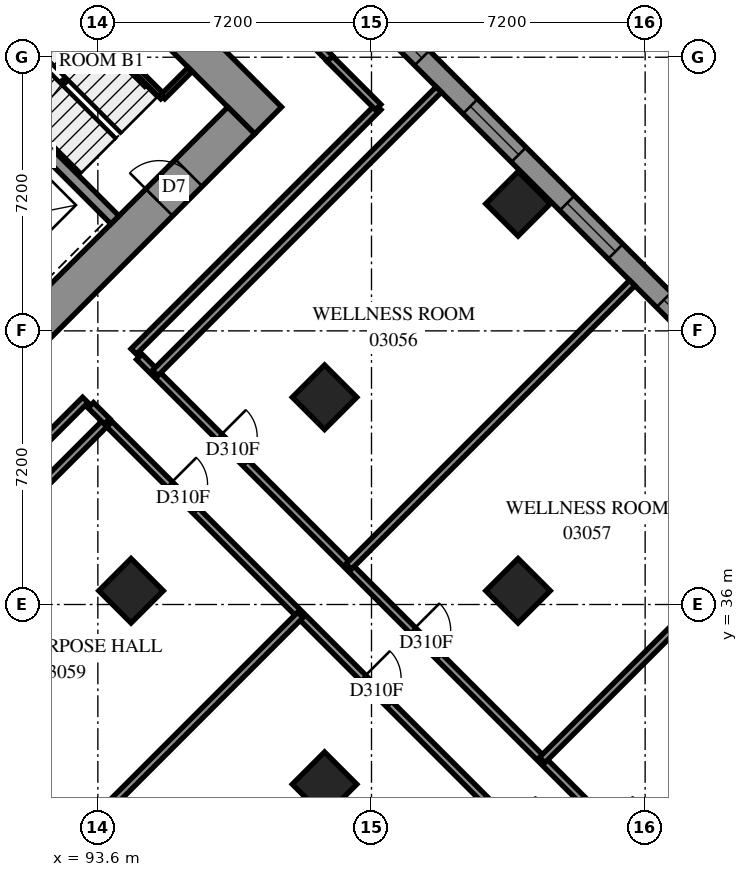
"""IFC4 building model, lengths in metres.
Left out: names, types, materials, properties, quantities, classifications, styles, units other than length and angle.
Written with IfcOpenShell. Run it as: python <this file> out.ifc"""

import sys

from ifc_helpers import new_model, si_unit, direction, frame, frame_2d, origin, origin_2d, place, context, subcontext, project, spatial, polyline, rectangle, outline, extrude, element, fill, save


model = new_model("IFC4")
c1 = context("Model", 3, precision=1e-05, world=origin(), true_north=direction((0.0, 1.0)))
c2 = subcontext(c1, "Body", "Model", "MODEL_VIEW")
j1 = project(units=[si_unit("LENGTHUNIT", "METRE"), si_unit("PLANEANGLEUNIT", "RADIAN")], contexts=[c1])
p1 = place(None, origin())
s1 = spatial("IfcSite", under=j1, at=p1, CompositionType="ELEMENT")
p2 = place(p1, origin())
s2 = spatial("IfcBuilding", under=s1, at=p2, CompositionType="ELEMENT")
p3 = place(p2, frame((0.0, 0.0, 14.4)))
s3 = spatial("IfcBuildingStorey", under=s2, at=p3, CompositionType="ELEMENT", Elevation=14.4)
for number, where, z_axis, x_axis in (
    (1, (104.656, 46.544, 0.0), (0.0, 0.0, 1.0), (0.707, -0.707, 0.0)),
    (2, (99.565, 41.453, 0.0), (0.0, 0.0, 1.0), (0.707, -0.707, 0.0)),
    (3, (94.474, 36.362, 0.0), (0.0, 0.0, 1.0), (0.707, -0.707, 0.0)),
    (4, (104.656, 36.362, 0.0), (0.0, 0.0, 1.0), (0.707, -0.707, 0.0)),
    (5, (99.565, 31.271, 0.0), (0.0, 0.0, 1.0), (0.707, -0.707, 0.0)),
):
    element("IfcColumn", number, at=place(p3, frame(where, z_axis=z_axis, x_axis=x_axis)), inside=s3, PredefinedType="COLUMN", context=c2, shape_type="SweptSolid", body=[
        extrude(rectangle(XDim=1.2, YDim=1.2, at=origin_2d()), origin(), (0.0, 0.0, 1.0), 3.8),
    ])
p4 = place(p3, frame((86.483, 60.333, -0.4), z_axis=(0.0, 0.0, 1.0), x_axis=(0.70710983, -0.7071037324, 0.0)))
e6 = element("IfcWall", 6, at=p4, inside=s3, PredefinedType="SHEAR", context=c2, shape_type="SweptSolid", body=[
    extrude(rectangle(XDim=16.4, YDim=1.0, at=frame_2d((8.2, 0.0))), origin(), (0.0, 0.0, 1.0), 3.5),
])
p5 = place(p4, frame((11.0, 0.0, 0.4)))
e7 = element("IfcOpeningElement", 7, at=p5, cuts=e6, PredefinedType="OPENING", context=c2, shape_type="SweptSolid", body=[
    extrude(rectangle(XDim=0.8, YDim=2.1, at=frame_2d((0.4, 1.05))), frame((0.0, 0.51, 0.0), z_axis=(0.0, -1.0, 0.0), x_axis=(1.0, 0.0, 0.0)), (0.0, 0.0, 1.0), 1.02),
])
p6 = place(p3, frame((87.19, 38.554, -0.4), z_axis=(0.0, 0.0, 1.0), x_axis=(0.707103309, 0.7071102534, 0.0)))
e8 = element("IfcWall", 8, at=p6, inside=s3, PredefinedType="SHEAR", context=c2, shape_type="SweptSolid", body=[
    extrude(rectangle(XDim=14.4, YDim=1.0, at=frame_2d((7.2, 0.0))), origin(), (0.0, 0.0, 1.0), 3.5),
])
p7 = place(p6, frame((4.55, 0.0, 0.4)))
e9 = element("IfcOpeningElement", 9, at=p7, cuts=e8, PredefinedType="OPENING", context=c2, shape_type="SweptSolid", body=[
    extrude(rectangle(XDim=1.1, YDim=2.1, at=frame_2d((0.55, 1.05))), frame((0.0, 0.51, 0.0), z_axis=(0.0, -1.0, 0.0), x_axis=(1.0, 0.0, 0.0)), (0.0, 0.0, 1.0), 1.02),
])
p8 = place(p6, frame((11.35, 0.0, 0.4)))
e10 = element("IfcOpeningElement", 10, at=p8, cuts=e8, PredefinedType="OPENING", context=c2, shape_type="SweptSolid", body=[
    extrude(rectangle(XDim=1.1, YDim=2.1, at=frame_2d((0.55, 1.05))), frame((0.0, 0.51, 0.0), z_axis=(0.0, -1.0, 0.0), x_axis=(1.0, 0.0, 0.0)), (0.0, 0.0, 1.0), 1.02),
])
p9 = place(p3, frame((88.958, 51.211, 0.0), z_axis=(0.0, 0.0, 1.0), x_axis=(0.7070998367, -0.7071137256, 0.0)))
e11 = element("IfcWall", 11, at=p9, inside=s3, PredefinedType="SOLIDWALL", context=c2, shape_type="SweptSolid", body=[
    extrude(rectangle(XDim=7.2, YDim=0.3, at=frame_2d((3.6, 0.0))), origin(), (0.0, 0.0, 1.0), 3.8),
])
p10 = place(p3, frame((117.843, 34.665, 0.0), z_axis=(0.0, 0.0, 1.0), x_axis=(-0.7071067812, 0.7071067812, 0.0)))
e12 = element("IfcWall", 12, at=p10, inside=s3, PredefinedType="SOLIDWALL", context=c2, shape_type="SweptSolid", body=[
    extrude(outline(polyline([(-0.275, -0.275), (54.222, -0.275), (53.994, 0.275), (0.275, 0.275), (-0.275, -0.275)])), origin(), (0.0, 0.0, 1.0), 3.8),
])
p11 = place(p10, frame((0.8, 0.0, 0.7)))
e13 = element("IfcOpeningElement", 13, at=p11, cuts=e12, PredefinedType="OPENING", context=c2, shape_type="SweptSolid", body=[
    extrude(rectangle(XDim=1.8, YDim=2.6, at=frame_2d((0.9, 1.3))), frame((0.0, 0.285, 0.0), z_axis=(0.0, -1.0, 0.0), x_axis=(1.0, 0.0, 0.0)), (0.0, 0.0, 1.0), 0.57),
])
p12 = place(p10, frame((4.225, 0.0, 0.7)))
e14 = element("IfcOpeningElement", 14, at=p12, cuts=e12, PredefinedType="OPENING", context=c2, shape_type="SweptSolid", body=[
    extrude(rectangle(XDim=1.8, YDim=2.6, at=frame_2d((0.9, 1.3))), frame((0.0, 0.285, 0.0), z_axis=(0.0, -1.0, 0.0), x_axis=(1.0, 0.0, 0.0)), (0.0, 0.0, 1.0), 0.57),
])
p13 = place(p10, frame((7.825, 0.0, 0.7)))
e15 = element("IfcOpeningElement", 15, at=p13, cuts=e12, PredefinedType="OPENING", context=c2, shape_type="SweptSolid", body=[
    extrude(rectangle(XDim=1.8, YDim=2.6, at=frame_2d((0.9, 1.3))), frame((0.0, 0.285, 0.0), z_axis=(0.0, -1.0, 0.0), x_axis=(1.0, 0.0, 0.0)), (0.0, 0.0, 1.0), 0.57),
])
p14 = place(p10, frame((11.425, 0.0, 0.7)))
e16 = element("IfcOpeningElement", 16, at=p14, cuts=e12, PredefinedType="OPENING", context=c2, shape_type="SweptSolid", body=[
    extrude(rectangle(XDim=1.8, YDim=2.6, at=frame_2d((0.9, 1.3))), frame((0.0, 0.285, 0.0), z_axis=(0.0, -1.0, 0.0), x_axis=(1.0, 0.0, 0.0)), (0.0, 0.0, 1.0), 0.57),
])
p15 = place(p10, frame((15.025, 0.0, 0.7)))
e17 = element("IfcOpeningElement", 17, at=p15, cuts=e12, PredefinedType="OPENING", context=c2, shape_type="SweptSolid", body=[
    extrude(rectangle(XDim=1.8, YDim=2.6, at=frame_2d((0.9, 1.3))), frame((0.0, 0.285, 0.0), z_axis=(0.0, -1.0, 0.0), x_axis=(1.0, 0.0, 0.0)), (0.0, 0.0, 1.0), 0.57),
])
p16 = place(p10, frame((18.625, 0.0, 0.7)))
e18 = element("IfcOpeningElement", 18, at=p16, cuts=e12, PredefinedType="OPENING", context=c2, shape_type="SweptSolid", body=[
    extrude(rectangle(XDim=1.8, YDim=2.6, at=frame_2d((0.9, 1.3))), frame((0.0, 0.285, 0.0), z_axis=(0.0, -1.0, 0.0), x_axis=(1.0, 0.0, 0.0)), (0.0, 0.0, 1.0), 0.57),
])
p17 = place(p10, frame((22.225, 0.0, 0.7)))
e19 = element("IfcOpeningElement", 19, at=p17, cuts=e12, PredefinedType="OPENING", context=c2, shape_type="SweptSolid", body=[
    extrude(rectangle(XDim=1.8, YDim=2.6, at=frame_2d((0.9, 1.3))), frame((0.0, 0.285, 0.0), z_axis=(0.0, -1.0, 0.0), x_axis=(1.0, 0.0, 0.0)), (0.0, 0.0, 1.0), 0.57),
])
p18 = place(p10, frame((25.825, 0.0, 0.7)))
e20 = element("IfcOpeningElement", 20, at=p18, cuts=e12, PredefinedType="OPENING", context=c2, shape_type="SweptSolid", body=[
    extrude(rectangle(XDim=1.8, YDim=2.6, at=frame_2d((0.9, 1.3))), frame((0.0, 0.285, 0.0), z_axis=(0.0, -1.0, 0.0), x_axis=(1.0, 0.0, 0.0)), (0.0, 0.0, 1.0), 0.57),
])
p19 = place(p10, frame((29.425, 0.0, 0.7)))
e21 = element("IfcOpeningElement", 21, at=p19, cuts=e12, PredefinedType="OPENING", context=c2, shape_type="SweptSolid", body=[
    extrude(rectangle(XDim=1.8, YDim=2.6, at=frame_2d((0.9, 1.3))), frame((0.0, 0.285, 0.0), z_axis=(0.0, -1.0, 0.0), x_axis=(1.0, 0.0, 0.0)), (0.0, 0.0, 1.0), 0.57),
])
p20 = place(p10, frame((33.025, 0.0, 0.7)))
e22 = element("IfcOpeningElement", 22, at=p20, cuts=e12, PredefinedType="OPENING", context=c2, shape_type="SweptSolid", body=[
    extrude(rectangle(XDim=1.8, YDim=2.6, at=frame_2d((0.9, 1.3))), frame((0.0, 0.285, 0.0), z_axis=(0.0, -1.0, 0.0), x_axis=(1.0, 0.0, 0.0)), (0.0, 0.0, 1.0), 0.57),
])
p21 = place(p10, frame((36.625, 0.0, 0.7)))
e23 = element("IfcOpeningElement", 23, at=p21, cuts=e12, PredefinedType="OPENING", context=c2, shape_type="SweptSolid", body=[
    extrude(rectangle(XDim=1.8, YDim=2.6, at=frame_2d((0.9, 1.3))), frame((0.0, 0.285, 0.0), z_axis=(0.0, -1.0, 0.0), x_axis=(1.0, 0.0, 0.0)), (0.0, 0.0, 1.0), 0.57),
])
p22 = place(p10, frame((40.225, 0.0, 0.7)))
e24 = element("IfcOpeningElement", 24, at=p22, cuts=e12, PredefinedType="OPENING", context=c2, shape_type="SweptSolid", body=[
    extrude(rectangle(XDim=1.8, YDim=2.6, at=frame_2d((0.9, 1.3))), frame((0.0, 0.285, 0.0), z_axis=(0.0, -1.0, 0.0), x_axis=(1.0, 0.0, 0.0)), (0.0, 0.0, 1.0), 0.57),
])
p23 = place(p10, frame((43.825, 0.0, 0.7)))
e25 = element("IfcOpeningElement", 25, at=p23, cuts=e12, PredefinedType="OPENING", context=c2, shape_type="SweptSolid", body=[
    extrude(rectangle(XDim=1.8, YDim=2.6, at=frame_2d((0.9, 1.3))), frame((0.0, 0.285, 0.0), z_axis=(0.0, -1.0, 0.0), x_axis=(1.0, 0.0, 0.0)), (0.0, 0.0, 1.0), 0.57),
])
p24 = place(p10, frame((47.425, 0.0, 0.7)))
e26 = element("IfcOpeningElement", 26, at=p24, cuts=e12, PredefinedType="OPENING", context=c2, shape_type="SweptSolid", body=[
    extrude(rectangle(XDim=1.8, YDim=2.6, at=frame_2d((0.9, 1.3))), frame((0.0, 0.285, 0.0), z_axis=(0.0, -1.0, 0.0), x_axis=(1.0, 0.0, 0.0)), (0.0, 0.0, 1.0), 0.57),
])
p25 = place(p10, frame((51.06, 0.0, 0.7)))
e27 = element("IfcOpeningElement", 27, at=p25, cuts=e12, PredefinedType="OPENING", context=c2, shape_type="SweptSolid", body=[
    extrude(rectangle(XDim=1.8, YDim=2.6, at=frame_2d((0.9, 1.3))), frame((0.0, 0.285, 0.0), z_axis=(0.0, -1.0, 0.0), x_axis=(1.0, 0.0, 0.0)), (0.0, 0.0, 1.0), 0.57),
])
p26 = place(p3, frame((77.07, 42.275, 0.0), z_axis=(0.0, 0.0, 1.0), x_axis=(0.7071067812, -0.7071067812, 0.0)))
e28 = element("IfcWall", 28, at=p26, inside=s3, PredefinedType="SOLIDWALL", context=c2, shape_type="SweptSolid", body=[
    extrude(outline(polyline([(0.114, -0.275), (39.288, -0.275), (38.737, 0.275), (-0.114, 0.275), (0.114, -0.275)])), origin(), (0.0, 0.0, 1.0), 3.8),
])
p27 = place(p26, frame((2.837, 0.0, 0.7)))
e29 = element("IfcOpeningElement", 29, at=p27, cuts=e28, PredefinedType="OPENING", context=c2, shape_type="SweptSolid", body=[
    extrude(rectangle(XDim=1.8, YDim=2.6, at=frame_2d((0.9, 1.3))), frame((0.0, 0.285, 0.0), z_axis=(0.0, -1.0, 0.0), x_axis=(1.0, 0.0, 0.0)), (0.0, 0.0, 1.0), 0.57),
])
p28 = place(p26, frame((6.588, 0.0, 0.7)))
e30 = element("IfcOpeningElement", 30, at=p28, cuts=e28, PredefinedType="OPENING", context=c2, shape_type="SweptSolid", body=[
    extrude(rectangle(XDim=1.8, YDim=2.6, at=frame_2d((0.9, 1.3))), frame((0.0, 0.285, 0.0), z_axis=(0.0, -1.0, 0.0), x_axis=(1.0, 0.0, 0.0)), (0.0, 0.0, 1.0), 0.57),
])
p29 = place(p26, frame((10.188, 0.0, 0.7)))
e31 = element("IfcOpeningElement", 31, at=p29, cuts=e28, PredefinedType="OPENING", context=c2, shape_type="SweptSolid", body=[
    extrude(rectangle(XDim=1.8, YDim=2.6, at=frame_2d((0.9, 1.3))), frame((0.0, 0.285, 0.0), z_axis=(0.0, -1.0, 0.0), x_axis=(1.0, 0.0, 0.0)), (0.0, 0.0, 1.0), 0.57),
])
p30 = place(p26, frame((13.787, 0.0, 0.7)))
e32 = element("IfcOpeningElement", 32, at=p30, cuts=e28, PredefinedType="OPENING", context=c2, shape_type="SweptSolid", body=[
    extrude(rectangle(XDim=1.8, YDim=2.6, at=frame_2d((0.9, 1.3))), frame((0.0, 0.285, 0.0), z_axis=(0.0, -1.0, 0.0), x_axis=(1.0, 0.0, 0.0)), (0.0, 0.0, 1.0), 0.57),
])
p31 = place(p26, frame((17.387, 0.0, 0.7)))
e33 = element("IfcOpeningElement", 33, at=p31, cuts=e28, PredefinedType="OPENING", context=c2, shape_type="SweptSolid", body=[
    extrude(rectangle(XDim=1.8, YDim=2.6, at=frame_2d((0.9, 1.3))), frame((0.0, 0.285, 0.0), z_axis=(0.0, -1.0, 0.0), x_axis=(1.0, 0.0, 0.0)), (0.0, 0.0, 1.0), 0.57),
])
p32 = place(p26, frame((20.988, 0.0, 0.7)))
e34 = element("IfcOpeningElement", 34, at=p32, cuts=e28, PredefinedType="OPENING", context=c2, shape_type="SweptSolid", body=[
    extrude(rectangle(XDim=1.8, YDim=2.6, at=frame_2d((0.9, 1.3))), frame((0.0, 0.285, 0.0), z_axis=(0.0, -1.0, 0.0), x_axis=(1.0, 0.0, 0.0)), (0.0, 0.0, 1.0), 0.57),
])
p33 = place(p26, frame((24.587, 0.0, 0.7)))
e35 = element("IfcOpeningElement", 35, at=p33, cuts=e28, PredefinedType="OPENING", context=c2, shape_type="SweptSolid", body=[
    extrude(rectangle(XDim=1.8, YDim=2.6, at=frame_2d((0.9, 1.3))), frame((0.0, 0.285, 0.0), z_axis=(0.0, -1.0, 0.0), x_axis=(1.0, 0.0, 0.0)), (0.0, 0.0, 1.0), 0.57),
])
p34 = place(p26, frame((28.188, 0.0, 0.7)))
e36 = element("IfcOpeningElement", 36, at=p34, cuts=e28, PredefinedType="OPENING", context=c2, shape_type="SweptSolid", body=[
    extrude(rectangle(XDim=1.8, YDim=2.6, at=frame_2d((0.9, 1.3))), frame((0.0, 0.285, 0.0), z_axis=(0.0, -1.0, 0.0), x_axis=(1.0, 0.0, 0.0)), (0.0, 0.0, 1.0), 0.57),
])
p35 = place(p26, frame((31.788, 0.0, 0.7)))
e37 = element("IfcOpeningElement", 37, at=p35, cuts=e28, PredefinedType="OPENING", context=c2, shape_type="SweptSolid", body=[
    extrude(rectangle(XDim=1.8, YDim=2.6, at=frame_2d((0.9, 1.3))), frame((0.0, 0.285, 0.0), z_axis=(0.0, -1.0, 0.0), x_axis=(1.0, 0.0, 0.0)), (0.0, 0.0, 1.0), 0.57),
])
p36 = place(p26, frame((35.388, 0.0, 0.7)))
e38 = element("IfcOpeningElement", 38, at=p36, cuts=e28, PredefinedType="OPENING", context=c2, shape_type="SweptSolid", body=[
    extrude(rectangle(XDim=1.8, YDim=2.6, at=frame_2d((0.9, 1.3))), frame((0.0, 0.285, 0.0), z_axis=(0.0, -1.0, 0.0), x_axis=(1.0, 0.0, 0.0)), (0.0, 0.0, 1.0), 0.57),
])
p37 = place(p3, frame((91.313, 53.354, 0.0), z_axis=(0.0, 0.0, 1.0), x_axis=(0.7071067812, -0.7071067812, 0.0)))
e39 = element("IfcWall", 39, at=p37, inside=s3, PredefinedType="PARTITIONING", context=c2, shape_type="SweptSolid", body=[
    extrude(rectangle(XDim=5.65, YDim=0.15, at=frame_2d((2.825, 0.0))), origin(), (0.0, 0.0, 1.0), 3.8),
])
p38 = place(p3, frame((95.308, 49.358, 0.0), z_axis=(0.0, 0.0, 1.0), x_axis=(0.70705776, 0.707155799, 0.0)))
e40 = element("IfcWall", 40, at=p38, inside=s3, PredefinedType="PARTITIONING", context=c2, shape_type="SweptSolid", body=[
    extrude(rectangle(XDim=1.02, YDim=0.15, at=frame_2d((0.51, 0.0))), origin(), (0.0, 0.0, 1.0), 3.8),
])
p39 = place(p3, frame((93.835, 40.813, 0.0), z_axis=(0.0, 0.0, 1.0), x_axis=(0.7071067812, -0.7071067812, 0.0)))
e41 = element("IfcWall", 41, at=p39, inside=s3, PredefinedType="PARTITIONING", context=c2, shape_type="SweptSolid", body=[
    extrude(rectangle(XDim=25.198, YDim=0.2, at=frame_2d((12.599, 0.0))), origin(), (0.0, 0.0, 1.0), 3.8),
])
p40 = place(p39, frame((2.337, 0.0, 0.0)))
e42 = element("IfcOpeningElement", 42, at=p40, cuts=e41, PredefinedType="OPENING", context=c2, shape_type="SweptSolid", body=[
    extrude(rectangle(XDim=1.0, YDim=2.1, at=frame_2d((0.5, 1.05))), frame((0.0, 0.11, 0.0), z_axis=(0.0, -1.0, 0.0), x_axis=(1.0, 0.0, 0.0)), (0.0, 0.0, 1.0), 0.22),
])
p41 = place(p39, frame((9.537, 0.0, 0.0)))
e43 = element("IfcOpeningElement", 43, at=p41, cuts=e41, PredefinedType="OPENING", context=c2, shape_type="SweptSolid", body=[
    extrude(rectangle(XDim=1.0, YDim=2.1, at=frame_2d((0.5, 1.05))), frame((0.0, 0.11, 0.0), z_axis=(0.0, -1.0, 0.0), x_axis=(1.0, 0.0, 0.0)), (0.0, 0.0, 1.0), 0.22),
])
p42 = place(p39, frame((14.966, 0.0, 0.0)))
e44 = element("IfcOpeningElement", 44, at=p42, cuts=e41, PredefinedType="OPENING", context=c2, shape_type="SweptSolid", body=[
    extrude(rectangle(XDim=1.0, YDim=2.1, at=frame_2d((0.5, 1.05))), frame((0.0, 0.11, 0.0), z_axis=(0.0, -1.0, 0.0), x_axis=(1.0, 0.0, 0.0)), (0.0, 0.0, 1.0), 0.22),
])
p43 = place(p39, frame((21.861, 0.0, 0.0)))
e45 = element("IfcOpeningElement", 45, at=p43, cuts=e41, PredefinedType="OPENING", context=c2, shape_type="SweptSolid", body=[
    extrude(rectangle(XDim=1.0, YDim=2.1, at=frame_2d((0.5, 1.05))), frame((0.0, 0.11, 0.0), z_axis=(0.0, -1.0, 0.0), x_axis=(1.0, 0.0, 0.0)), (0.0, 0.0, 1.0), 0.22),
])
p44 = place(p3, frame((94.689, 42.517, 0.0), z_axis=(0.0, 0.0, 1.0), x_axis=(0.7071067812, -0.7071067812, 0.0)))
e46 = element("IfcWall", 46, at=p44, inside=s3, PredefinedType="PARTITIONING", context=c2, shape_type="SweptSolid", body=[
    extrude(rectangle(XDim=22.2, YDim=0.2, at=frame_2d((11.1, 0.0))), origin(), (0.0, 0.0, 1.0), 3.8),
])
p45 = place(p44, frame((2.974, 0.0, 0.0)))
e47 = element("IfcOpeningElement", 47, at=p45, cuts=e46, PredefinedType="OPENING", context=c2, shape_type="SweptSolid", body=[
    extrude(rectangle(XDim=1.0, YDim=2.1, at=frame_2d((0.5, 1.05))), frame((0.0, 0.11, 0.0), z_axis=(0.0, -1.0, 0.0), x_axis=(1.0, 0.0, 0.0)), (0.0, 0.0, 1.0), 0.22),
])
p46 = place(p44, frame((10.174, 0.0, 0.0)))
e48 = element("IfcOpeningElement", 48, at=p46, cuts=e46, PredefinedType="OPENING", context=c2, shape_type="SweptSolid", body=[
    extrude(rectangle(XDim=1.0, YDim=2.1, at=frame_2d((0.5, 1.05))), frame((0.0, 0.11, 0.0), z_axis=(0.0, -1.0, 0.0), x_axis=(1.0, 0.0, 0.0)), (0.0, 0.0, 1.0), 0.22),
])
p47 = place(p44, frame((17.374, 0.0, 0.0)))
e49 = element("IfcOpeningElement", 49, at=p47, cuts=e46, PredefinedType="OPENING", context=c2, shape_type="SweptSolid", body=[
    extrude(rectangle(XDim=1.0, YDim=2.1, at=frame_2d((0.5, 1.05))), frame((0.0, 0.11, 0.0), z_axis=(0.0, -1.0, 0.0), x_axis=(1.0, 0.0, 0.0)), (0.0, 0.0, 1.0), 0.22),
])
for number, where, z_axis, x_axis in (
    (50, (86.376, 33.357, 0.0), (0.0, 0.0, 1.0), (0.707, 0.707, 0.0)),
    (51, (91.468, 28.266, 0.0), (0.0, 0.0, 1.0), (0.707, 0.707, 0.0)),
):
    element("IfcWall", number, at=place(p3, frame(where, z_axis=z_axis, x_axis=x_axis)), inside=s3, PredefinedType="PARTITIONING", context=c2, shape_type="SweptSolid", body=[
        extrude(rectangle(XDim=10.55, YDim=0.2, at=frame_2d((5.275, 0.0))), origin(), (0.0, 0.0, 1.0), 3.8),
    ])
for number, where, z_axis, x_axis in (
    (52, (95.109, 42.091, 0.0), (0.0, 0.0, 1.0), (0.707, 0.707, 0.0)),
    (53, (105.292, 31.908, 0.0), (0.0, 0.0, 1.0), (0.707, 0.707, 0.0)),
    (54, (100.201, 36.999, 0.0), (0.0, 0.0, 1.0), (0.707, 0.707, 0.0)),
):
    element("IfcWall", number, at=place(p3, frame(where, z_axis=z_axis, x_axis=x_axis)), inside=s3, PredefinedType="PARTITIONING", context=c2, shape_type="SweptSolid", body=[
        extrude(rectangle(XDim=10.55, YDim=0.2, at=frame_2d((5.275, 0.0))), origin(), (0.0, 0.0, 1.0), 3.8),
    ])
for number, where, z_axis, x_axis in (
    (55, (94.544, 42.656, 0.0), (0.0, 0.0, 1.0), (0.707, 0.707, 0.0)),
    (56, (86.836, 34.948, 0.0), (0.0, 0.0, 1.0), (0.707, 0.707, 0.0)),
):
    element("IfcWall", number, at=place(p3, frame(where, z_axis=z_axis, x_axis=x_axis)), inside=s3, PredefinedType="PARTITIONING", context=c2, shape_type="SweptSolid", body=[
        extrude(rectangle(XDim=9.099, YDim=0.2, at=frame_2d((4.55, 0.0))), origin(), (0.0, 0.0, 1.0), 3.8),
    ])
p48 = place(p3, frame((99.703, 50.359, 0.0), z_axis=(0.0, 0.0, 1.0), x_axis=(0.7071067812, -0.7071067812, 0.0)))
e57 = element("IfcWall", 57, at=p48, inside=s3, PredefinedType="PARTITIONING", context=c2, shape_type="SweptSolid", body=[
    extrude(rectangle(XDim=1.799, YDim=0.2, at=frame_2d((0.899, 0.0))), origin(), (0.0, 0.0, 1.0), 3.8),
])
p49 = place(p3, frame((99.037, 51.039, 0.0), z_axis=(0.0, 0.0, 1.0), x_axis=(0.706055323, -0.7081566782, 0.0)))
e58 = element("IfcWall", 58, at=p49, inside=s3, PredefinedType="PARTITIONING", context=c2, shape_type="SweptSolid", body=[
    extrude(rectangle(XDim=0.952, YDim=0.2, at=frame_2d((0.476, 0.0))), origin(), (0.0, 0.0, 1.0), 3.8),
])
p50 = place(p3, frame((93.415, 41.243, 0.0), z_axis=(0.0, 0.0, 1.0), x_axis=(0.7087685999, -0.7054410477, 0.0)))
e59 = element("IfcWall", 59, at=p50, inside=s3, PredefinedType="PARTITIONING", context=c2, shape_type="SweptSolid", body=[
    extrude(rectangle(XDim=0.601, YDim=0.2, at=frame_2d((0.3, 0.0))), origin(), (0.0, 0.0, 1.0), 3.8),
])
p51 = place(p14, origin())
e60 = element("IfcWindow", 60, at=p51, inside=s3, PartitioningType="SINGLE_PANEL", PredefinedType="WINDOW", context=c2, shape_type="SweptSolid", body=[
    extrude(rectangle(XDim=1.8, YDim=2.6, at=frame_2d((0.9, 1.3))), frame((0.0, 0.155, 0.0), z_axis=(0.0, -1.0, 0.0), x_axis=(1.0, 0.0, 0.0)), (0.0, 0.0, 1.0), 0.06),
])
fill(e16, e60)
p52 = place(p15, origin())
e61 = element("IfcWindow", 61, at=p52, inside=s3, PartitioningType="SINGLE_PANEL", PredefinedType="WINDOW", context=c2, shape_type="SweptSolid", body=[
    extrude(rectangle(XDim=1.8, YDim=2.6, at=frame_2d((0.9, 1.3))), frame((0.0, 0.155, 0.0), z_axis=(0.0, -1.0, 0.0), x_axis=(1.0, 0.0, 0.0)), (0.0, 0.0, 1.0), 0.06),
])
fill(e17, e61)
p53 = place(p16, origin())
e62 = element("IfcWindow", 62, at=p53, inside=s3, PartitioningType="SINGLE_PANEL", PredefinedType="WINDOW", context=c2, shape_type="SweptSolid", body=[
    extrude(rectangle(XDim=1.8, YDim=2.6, at=frame_2d((0.9, 1.3))), frame((0.0, 0.155, 0.0), z_axis=(0.0, -1.0, 0.0), x_axis=(1.0, 0.0, 0.0)), (0.0, 0.0, 1.0), 0.06),
])
fill(e18, e62)
p54 = place(p17, origin())
e63 = element("IfcWindow", 63, at=p54, inside=s3, PartitioningType="SINGLE_PANEL", PredefinedType="WINDOW", context=c2, shape_type="SweptSolid", body=[
    extrude(rectangle(XDim=1.8, YDim=2.6, at=frame_2d((0.9, 1.3))), frame((0.0, 0.155, 0.0), z_axis=(0.0, -1.0, 0.0), x_axis=(1.0, 0.0, 0.0)), (0.0, 0.0, 1.0), 0.06),
])
fill(e19, e63)
p55 = place(p8, origin())
e64 = element("IfcDoor", 64, at=p55, inside=s3, OperationType="SINGLE_SWING_RIGHT", PredefinedType="DOOR", context=c2, shape_type="SweptSolid", body=[
    extrude(rectangle(XDim=1.1, YDim=2.1, at=frame_2d((0.55, 1.05))), frame((0.0, 0.025, 0.0), z_axis=(0.0, -1.0, 0.0), x_axis=(1.0, 0.0, 0.0)), (0.0, 0.0, 1.0), 0.05),
])
fill(e10, e64)
p56 = place(p45, origin())
e65 = element("IfcDoor", 65, at=p56, inside=s3, OperationType="SINGLE_SWING_RIGHT", PredefinedType="DOOR", context=c2, shape_type="SweptSolid", body=[
    extrude(rectangle(XDim=1.0, YDim=2.1, at=frame_2d((0.5, 1.05))), frame((0.0, 0.025, 0.0), z_axis=(0.0, -1.0, 0.0), x_axis=(1.0, 0.0, 0.0)), (0.0, 0.0, 1.0), 0.05),
])
fill(e47, e65)
p57 = place(p46, origin())
e66 = element("IfcDoor", 66, at=p57, inside=s3, OperationType="SINGLE_SWING_RIGHT", PredefinedType="DOOR", context=c2, shape_type="SweptSolid", body=[
    extrude(rectangle(XDim=1.0, YDim=2.1, at=frame_2d((0.5, 1.05))), frame((0.0, 0.025, 0.0), z_axis=(0.0, -1.0, 0.0), x_axis=(1.0, 0.0, 0.0)), (0.0, 0.0, 1.0), 0.05),
])
fill(e48, e66)
p58 = place(p40, origin())
e67 = element("IfcDoor", 67, at=p58, inside=s3, OperationType="SINGLE_SWING_LEFT", PredefinedType="DOOR", context=c2, shape_type="SweptSolid", body=[
    extrude(rectangle(XDim=1.0, YDim=2.1, at=frame_2d((0.5, 1.05))), frame((0.0, 0.025, 0.0), z_axis=(0.0, -1.0, 0.0), x_axis=(1.0, 0.0, 0.0)), (0.0, 0.0, 1.0), 0.05),
])
fill(e42, e67)
p59 = place(p41, origin())
e68 = element("IfcDoor", 68, at=p59, inside=s3, OperationType="SINGLE_SWING_LEFT", PredefinedType="DOOR", context=c2, shape_type="SweptSolid", body=[
    extrude(rectangle(XDim=1.0, YDim=2.1, at=frame_2d((0.5, 1.05))), frame((0.0, 0.025, 0.0), z_axis=(0.0, -1.0, 0.0), x_axis=(1.0, 0.0, 0.0)), (0.0, 0.0, 1.0), 0.05),
])
fill(e43, e68)
save(model, sys.argv[1])
